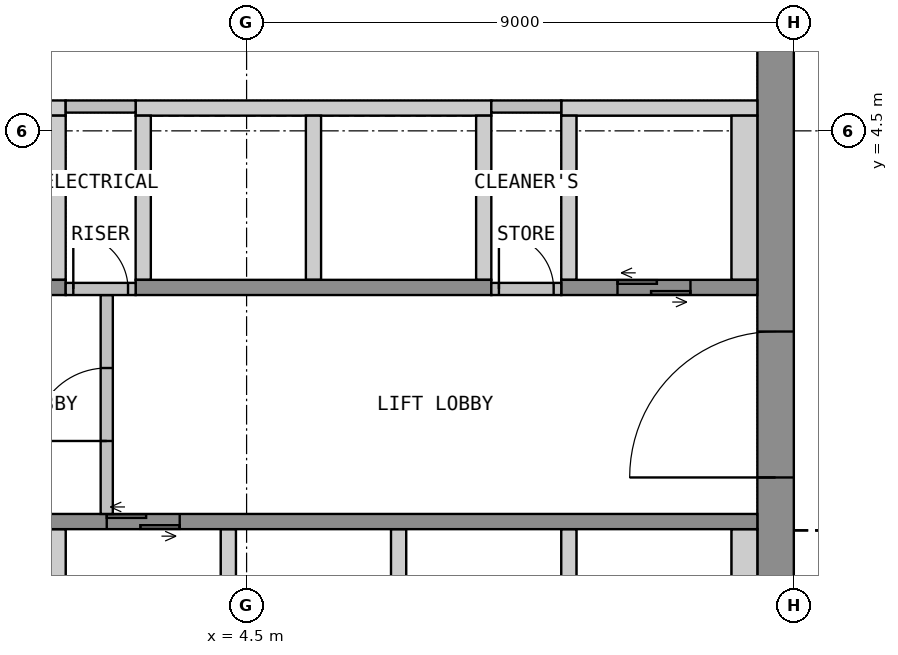
"""IFC4 building model, lengths in metres.
Left out: names, types, materials, properties, quantities, classifications, styles, units other than length and angle.
Written with IfcOpenShell. Run it as: python <this file> out.ifc"""

import sys

from ifc_helpers import new_model, si_unit, direction, frame, frame_2d, origin, place, context, subcontext, project, spatial, polyline, rectangle, outline, extrude, element, fill, save


model = new_model("IFC4")
c1 = context("Model", 3, precision=1e-05, world=origin(), true_north=direction((0.0, 1.0)))
c2 = subcontext(c1, "Body", "Model", "MODEL_VIEW")
j1 = project(units=[si_unit("LENGTHUNIT", "METRE"), si_unit("PLANEANGLEUNIT", "RADIAN")], contexts=[c1])
p1 = place(None, origin())
s1 = spatial("IfcSite", under=j1, at=p1, CompositionType="ELEMENT")
p2 = place(p1, origin())
s2 = spatial("IfcBuilding", under=s1, at=p2, CompositionType="ELEMENT")
p3 = place(p2, frame((0.0, 0.0, 230.7)))
s3 = spatial("IfcBuildingStorey", under=s2, at=p3, CompositionType="ELEMENT", Elevation=230.7)
p4 = place(p3, frame((13.2, -10.65, 0.0), z_axis=(0.0, 0.0, 1.0), x_axis=(0.0, 1.0, 0.0)))
e1 = element("IfcWall", 1, at=p4, inside=s3, PredefinedType="SHEAR", context=c2, shape_type="SweptSolid", body=[
    extrude(rectangle(XDim=21.3, YDim=0.6, at=frame_2d((10.65, 0.0))), origin(), (0.0, 0.0, 1.0), 4.175),
])
p5 = place(p4, frame((9.45, 0.0, 0.0)))
e2 = element("IfcOpeningElement", 2, at=p5, cuts=e1, PredefinedType="OPENING", context=c2, shape_type="SweptSolid", body=[
    extrude(rectangle(XDim=2.4, YDim=2.1, at=frame_2d((1.2, 1.05))), frame((0.0, 0.31, 0.0), z_axis=(0.0, -1.0, 0.0), x_axis=(1.0, 0.0, 0.0)), (0.0, 0.0, 1.0), 0.62),
])
p6 = place(p3, origin())
e3 = element("IfcWall", 3, at=p6, inside=s3, PredefinedType="SHEAR", context=c2, shape_type="SweptSolid", body=[
    extrude(outline(polyline([(-1.525, 4.75), (1.525, 4.75), (1.525, 5.0), (-1.525, 5.0), (-1.525, 4.75)])), origin(), (0.0, 0.0, 1.0), 4.175),
])
p7 = place(p3, origin())
e4 = element("IfcWall", 4, at=p7, inside=s3, PredefinedType="SHEAR", context=c2, shape_type="SweptSolid", body=[
    extrude(outline(polyline([(2.675, 4.75), (8.525, 4.75), (8.525, 5.0), (2.675, 5.0), (2.675, 4.75)])), origin(), (0.0, 0.0, 1.0), 4.175),
])
p8 = place(p3, origin())
e5 = element("IfcWall", 5, at=p8, inside=s3, PredefinedType="SHEAR", context=c2, shape_type="SweptSolid", body=[
    extrude(outline(polyline([(9.675, 4.75), (12.9, 4.75), (12.9, 5.0), (9.675, 5.0), (9.675, 4.75)])), origin(), (0.0, 0.0, 1.0), 4.175),
])
p9 = place(p3, origin())
e6 = element("IfcWall", 6, at=p9, inside=s3, PredefinedType="SHEAR", context=c2, shape_type="SweptSolid", body=[
    extrude(outline(polyline([(1.275, 2.05), (1.525, 2.05), (1.525, 4.75), (1.275, 4.75), (1.275, 2.05)])), origin(), (0.0, 0.0, 1.0), 4.175),
])
p10 = place(p3, origin())
e7 = element("IfcWall", 7, at=p10, inside=s3, PredefinedType="SHEAR", context=c2, shape_type="SweptSolid", body=[
    extrude(outline(polyline([(2.675, 2.05), (2.925, 2.05), (2.925, 4.75), (2.675, 4.75), (2.675, 2.05)])), origin(), (0.0, 0.0, 1.0), 4.175),
])
p11 = place(p3, origin())
e8 = element("IfcWall", 8, at=p11, inside=s3, PredefinedType="SHEAR", context=c2, shape_type="SweptSolid", body=[
    extrude(outline(polyline([(5.475, 2.05), (5.725, 2.05), (5.725, 4.75), (5.475, 4.75), (5.475, 2.05)])), origin(), (0.0, 0.0, 1.0), 4.175),
])
p12 = place(p3, origin())
e9 = element("IfcWall", 9, at=p12, inside=s3, PredefinedType="SHEAR", context=c2, shape_type="SweptSolid", body=[
    extrude(outline(polyline([(8.275, 2.05), (8.525, 2.05), (8.525, 4.75), (8.275, 4.75), (8.275, 2.05)])), origin(), (0.0, 0.0, 1.0), 4.175),
])
p13 = place(p3, origin())
e10 = element("IfcWall", 10, at=p13, inside=s3, PredefinedType="SHEAR", context=c2, shape_type="SweptSolid", body=[
    extrude(outline(polyline([(9.675, 2.05), (9.925, 2.05), (9.925, 4.75), (9.675, 4.75), (9.675, 2.05)])), origin(), (0.0, 0.0, 1.0), 4.175),
])
p14 = place(p3, origin())
e11 = element("IfcWall", 11, at=p14, inside=s3, PredefinedType="SHEAR", context=c2, shape_type="SweptSolid", body=[
    extrude(outline(polyline([(12.475, 2.05), (12.9, 2.05), (12.9, 4.75), (12.475, 4.75), (12.475, 2.05)])), origin(), (0.0, 0.0, 1.0), 4.175),
])
p15 = place(p3, frame((-1.525, 1.925, 0.0), z_axis=(0.0, 0.0, 1.0), x_axis=(1.0, 0.0, 0.0)))
e12 = element("IfcWall", 12, at=p15, inside=s3, PredefinedType="SHEAR", context=c2, shape_type="SweptSolid", body=[
    extrude(rectangle(XDim=3.05, YDim=0.25, at=frame_2d((1.525, 0.0))), origin(), (0.0, 0.0, 1.0), 4.175),
])
p16 = place(p15, frame((0.925, 0.0, 0.0)))
e13 = element("IfcOpeningElement", 13, at=p16, cuts=e12, PredefinedType="OPENING", context=c2, shape_type="SweptSolid", body=[
    extrude(rectangle(XDim=1.2, YDim=2.1, at=frame_2d((0.6, 1.05))), frame((0.0, 0.135, 0.0), z_axis=(0.0, -1.0, 0.0), x_axis=(1.0, 0.0, 0.0)), (0.0, 0.0, 1.0), 0.27),
])
p17 = place(p3, frame((2.675, 1.925, 0.0), z_axis=(0.0, 0.0, 1.0), x_axis=(1.0, 0.0, 0.0)))
e14 = element("IfcWall", 14, at=p17, inside=s3, PredefinedType="SHEAR", context=c2, shape_type="SweptSolid", body=[
    extrude(rectangle(XDim=5.85, YDim=0.25, at=frame_2d((2.925, 0.0))), origin(), (0.0, 0.0, 1.0), 4.175),
])
p18 = place(p3, frame((9.675, 1.925, 0.0), z_axis=(0.0, 0.0, 1.0), x_axis=(1.0, 0.0, 0.0)))
e15 = element("IfcWall", 15, at=p18, inside=s3, PredefinedType="SHEAR", context=c2, shape_type="SweptSolid", body=[
    extrude(rectangle(XDim=3.225, YDim=0.25, at=frame_2d((1.612, 0.0))), origin(), (0.0, 0.0, 1.0), 4.175),
])
p19 = place(p18, frame((0.925, 0.0, 0.0)))
e16 = element("IfcOpeningElement", 16, at=p19, cuts=e15, PredefinedType="OPENING", context=c2, shape_type="SweptSolid", body=[
    extrude(rectangle(XDim=1.2, YDim=2.1, at=frame_2d((0.6, 1.05))), frame((0.0, 0.135, 0.0), z_axis=(0.0, -1.0, 0.0), x_axis=(1.0, 0.0, 0.0)), (0.0, 0.0, 1.0), 0.27),
])
p20 = place(p3, origin())
e17 = element("IfcWall", 17, at=p20, inside=s3, PredefinedType="SHEAR", context=c2, shape_type="SweptSolid", body=[
    extrude(outline(polyline([(1.275, -4.75), (1.525, -4.75), (1.525, -2.05), (1.275, -2.05), (1.275, -4.75)])), origin(), (0.0, 0.0, 1.0), 4.175),
])
p21 = place(p3, origin())
e18 = element("IfcWall", 18, at=p21, inside=s3, PredefinedType="SHEAR", context=c2, shape_type="SweptSolid", body=[
    extrude(outline(polyline([(4.075, -4.75), (4.325, -4.75), (4.325, -2.05), (4.075, -2.05), (4.075, -4.75)])), origin(), (0.0, 0.0, 1.0), 4.175),
])
p22 = place(p3, origin())
e19 = element("IfcWall", 19, at=p22, inside=s3, PredefinedType="SHEAR", context=c2, shape_type="SweptSolid", body=[
    extrude(outline(polyline([(6.875, -4.75), (7.125, -4.75), (7.125, -2.05), (6.875, -2.05), (6.875, -4.75)])), origin(), (0.0, 0.0, 1.0), 4.175),
])
p23 = place(p3, origin())
e20 = element("IfcWall", 20, at=p23, inside=s3, PredefinedType="SHEAR", context=c2, shape_type="SweptSolid", body=[
    extrude(outline(polyline([(9.675, -4.75), (9.925, -4.75), (9.925, -2.05), (9.675, -2.05), (9.675, -4.75)])), origin(), (0.0, 0.0, 1.0), 4.175),
])
p24 = place(p3, origin())
e21 = element("IfcWall", 21, at=p24, inside=s3, PredefinedType="SHEAR", context=c2, shape_type="SweptSolid", body=[
    extrude(outline(polyline([(12.475, -4.75), (12.9, -4.75), (12.9, -2.05), (12.475, -2.05), (12.475, -4.75)])), origin(), (0.0, 0.0, 1.0), 4.175),
])
p25 = place(p3, frame((-1.525, -1.925, 0.0), z_axis=(0.0, 0.0, 1.0), x_axis=(1.0, 0.0, 0.0)))
e22 = element("IfcWall", 22, at=p25, inside=s3, PredefinedType="SHEAR", context=c2, shape_type="SweptSolid", body=[
    extrude(rectangle(XDim=14.425, YDim=0.25, at=frame_2d((7.212, 0.0))), origin(), (0.0, 0.0, 1.0), 4.175),
])
p26 = place(p25, frame((0.925, 0.0, 0.0)))
e23 = element("IfcOpeningElement", 23, at=p26, cuts=e22, PredefinedType="OPENING", context=c2, shape_type="SweptSolid", body=[
    extrude(rectangle(XDim=1.2, YDim=2.1, at=frame_2d((0.6, 1.05))), frame((0.0, 0.135, 0.0), z_axis=(0.0, -1.0, 0.0), x_axis=(1.0, 0.0, 0.0)), (0.0, 0.0, 1.0), 0.27),
])
p27 = place(p25, frame((3.725, 0.0, 0.0)))
e24 = element("IfcOpeningElement", 24, at=p27, cuts=e22, PredefinedType="OPENING", context=c2, shape_type="SweptSolid", body=[
    extrude(rectangle(XDim=1.2, YDim=2.1, at=frame_2d((0.6, 1.05))), frame((0.0, 0.135, 0.0), z_axis=(0.0, -1.0, 0.0), x_axis=(1.0, 0.0, 0.0)), (0.0, 0.0, 1.0), 0.27),
])
p28 = place(p3, frame((2.2, -1.8, 0.0), z_axis=(0.0, 0.0, 1.0), x_axis=(0.0, 1.0, 0.0)))
e25 = element("IfcWall", 25, at=p28, inside=s3, PredefinedType="PARTITIONING", context=c2, shape_type="SweptSolid", body=[
    extrude(rectangle(XDim=3.6, YDim=0.2, at=frame_2d((1.8, 0.0))), origin(), (0.0, 0.0, 1.0), 4.175),
])
p29 = place(p28, frame((1.2, 0.0, 0.0)))
e26 = element("IfcOpeningElement", 26, at=p29, cuts=e25, PredefinedType="OPENING", context=c2, shape_type="SweptSolid", body=[
    extrude(rectangle(XDim=1.2, YDim=2.1, at=frame_2d((0.6, 1.05))), frame((0.0, 0.11, 0.0), z_axis=(0.0, -1.0, 0.0), x_axis=(1.0, 0.0, 0.0)), (0.0, 0.0, 1.0), 0.22),
])
p30 = place(p3, frame((1.525, 1.9, 0.0), z_axis=(0.0, 0.0, 1.0), x_axis=(1.0, 0.0, 0.0)))
e27 = element("IfcWall", 27, at=p30, inside=s3, PredefinedType="PARTITIONING", context=c2, shape_type="SweptSolid", body=[
    extrude(rectangle(XDim=1.15, YDim=0.2, at=frame_2d((0.575, 0.0))), origin(), (0.0, 0.0, 1.0), 4.175),
])
p31 = place(p30, frame((0.125, 0.0, 0.0)))
e28 = element("IfcOpeningElement", 28, at=p31, cuts=e27, PredefinedType="OPENING", context=c2, shape_type="SweptSolid", body=[
    extrude(rectangle(XDim=0.9, YDim=2.1, at=frame_2d((0.45, 1.05))), frame((0.0, 0.11, 0.0), z_axis=(0.0, -1.0, 0.0), x_axis=(1.0, 0.0, 0.0)), (0.0, 0.0, 1.0), 0.22),
])
p32 = place(p3, frame((1.525, 4.9, 0.0), z_axis=(0.0, 0.0, 1.0), x_axis=(1.0, 0.0, 0.0)))
e29 = element("IfcWall", 29, at=p32, inside=s3, PredefinedType="PARTITIONING", context=c2, shape_type="SweptSolid", body=[
    extrude(rectangle(XDim=1.15, YDim=0.2, at=frame_2d((0.575, 0.0))), origin(), (0.0, 0.0, 1.0), 4.175),
])
p33 = place(p3, frame((8.525, 1.9, 0.0), z_axis=(0.0, 0.0, 1.0), x_axis=(1.0, 0.0, 0.0)))
e30 = element("IfcWall", 30, at=p33, inside=s3, PredefinedType="PARTITIONING", context=c2, shape_type="SweptSolid", body=[
    extrude(rectangle(XDim=1.15, YDim=0.2, at=frame_2d((0.575, 0.0))), origin(), (0.0, 0.0, 1.0), 4.175),
])
p34 = place(p33, frame((0.125, 0.0, 0.0)))
e31 = element("IfcOpeningElement", 31, at=p34, cuts=e30, PredefinedType="OPENING", context=c2, shape_type="SweptSolid", body=[
    extrude(rectangle(XDim=0.9, YDim=2.1, at=frame_2d((0.45, 1.05))), frame((0.0, 0.11, 0.0), z_axis=(0.0, -1.0, 0.0), x_axis=(1.0, 0.0, 0.0)), (0.0, 0.0, 1.0), 0.22),
])
p35 = place(p3, frame((8.525, 4.9, 0.0), z_axis=(0.0, 0.0, 1.0), x_axis=(1.0, 0.0, 0.0)))
e32 = element("IfcWall", 32, at=p35, inside=s3, PredefinedType="PARTITIONING", context=c2, shape_type="SweptSolid", body=[
    extrude(rectangle(XDim=1.15, YDim=0.2, at=frame_2d((0.575, 0.0))), origin(), (0.0, 0.0, 1.0), 4.175),
])
p36 = place(p5, origin())
e33 = element("IfcDoor", 33, at=p36, inside=s3, OperationType="DOUBLE_DOOR_DOUBLE_SWING", PredefinedType="DOOR", context=c2, shape_type="SweptSolid", body=[
    extrude(rectangle(XDim=2.4, YDim=2.1, at=frame_2d((1.2, 1.05))), frame((0.0, 0.025, 0.0), z_axis=(0.0, -1.0, 0.0), x_axis=(1.0, 0.0, 0.0)), (0.0, 0.0, 1.0), 0.05),
])
fill(e2, e33)
p37 = place(p19, origin())
e34 = element("IfcDoor", 34, at=p37, inside=s3, OperationType="DOUBLE_DOOR_SLIDING", PredefinedType="DOOR", context=c2, shape_type="SweptSolid", body=[
    extrude(rectangle(XDim=1.2, YDim=2.1, at=frame_2d((0.6, 1.05))), frame((0.0, 0.025, 0.0), z_axis=(0.0, -1.0, 0.0), x_axis=(1.0, 0.0, 0.0)), (0.0, 0.0, 1.0), 0.05),
])
fill(e16, e34)
p38 = place(p27, origin())
e35 = element("IfcDoor", 35, at=p38, inside=s3, OperationType="DOUBLE_DOOR_SLIDING", PredefinedType="DOOR", context=c2, shape_type="SweptSolid", body=[
    extrude(rectangle(XDim=1.2, YDim=2.1, at=frame_2d((0.6, 1.05))), frame((0.0, 0.025, 0.0), z_axis=(0.0, -1.0, 0.0), x_axis=(1.0, 0.0, 0.0)), (0.0, 0.0, 1.0), 0.05),
])
fill(e24, e35)
p39 = place(p29, origin())
e36 = element("IfcDoor", 36, at=p39, inside=s3, OperationType="SINGLE_SWING_LEFT", PredefinedType="DOOR", context=c2, shape_type="SweptSolid", body=[
    extrude(rectangle(XDim=1.2, YDim=2.1, at=frame_2d((0.6, 1.05))), frame((0.0, 0.025, 0.0), z_axis=(0.0, -1.0, 0.0), x_axis=(1.0, 0.0, 0.0)), (0.0, 0.0, 1.0), 0.05),
])
fill(e26, e36)
p40 = place(p31, origin())
e37 = element("IfcDoor", 37, at=p40, inside=s3, OperationType="SINGLE_SWING_LEFT", PredefinedType="DOOR", context=c2, shape_type="SweptSolid", body=[
    extrude(rectangle(XDim=0.9, YDim=2.1, at=frame_2d((0.45, 1.05))), frame((0.0, 0.025, 0.0), z_axis=(0.0, -1.0, 0.0), x_axis=(1.0, 0.0, 0.0)), (0.0, 0.0, 1.0), 0.05),
])
fill(e28, e37)
p41 = place(p34, origin())
e38 = element("IfcDoor", 38, at=p41, inside=s3, OperationType="SINGLE_SWING_LEFT", PredefinedType="DOOR", context=c2, shape_type="SweptSolid", body=[
    extrude(rectangle(XDim=0.9, YDim=2.1, at=frame_2d((0.45, 1.05))), frame((0.0, 0.025, 0.0), z_axis=(0.0, -1.0, 0.0), x_axis=(1.0, 0.0, 0.0)), (0.0, 0.0, 1.0), 0.05),
])
fill(e31, e38)
save(model, sys.argv[1])
